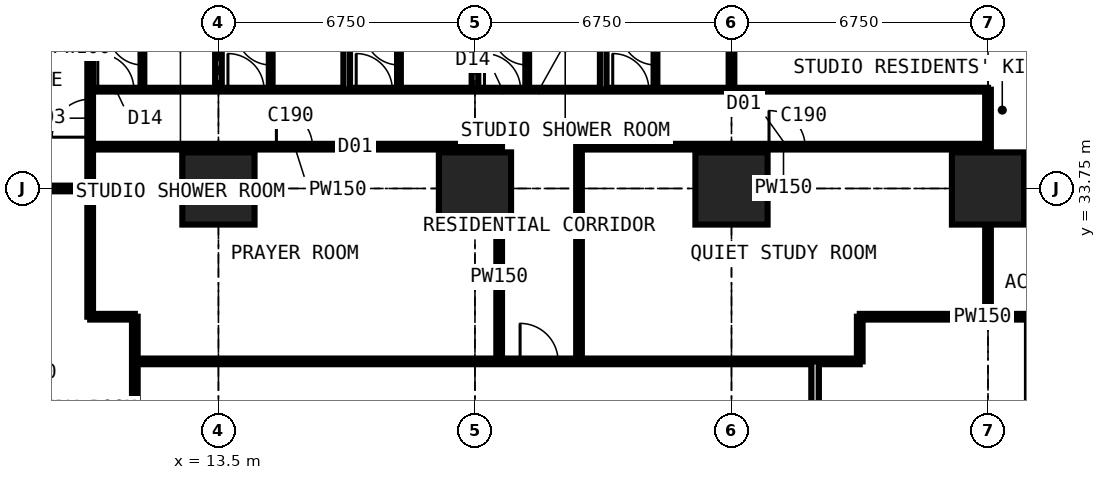
"""IFC4 building model, lengths in metres.
Left out: names, types, materials, properties, quantities, classifications, styles, units other than length and angle.
Written with IfcOpenShell. Run it as: python <this file> out.ifc"""

import sys

from ifc_helpers import new_model, si_unit, direction, frame, frame_2d, origin, origin_2d, place, context, subcontext, project, spatial, rectangle, extrude, element, fill, save


model = new_model("IFC4")
c1 = context("Model", 3, precision=1e-05, world=origin(), true_north=direction((0.0, 1.0)))
c2 = subcontext(c1, "Body", "Model", "MODEL_VIEW")
j1 = project(units=[si_unit("LENGTHUNIT", "METRE"), si_unit("PLANEANGLEUNIT", "RADIAN")], contexts=[c1])
p1 = place(None, origin())
s1 = spatial("IfcSite", under=j1, at=p1, CompositionType="ELEMENT")
p2 = place(p1, origin())
s2 = spatial("IfcBuilding", under=s1, at=p2, CompositionType="ELEMENT")
p3 = place(p2, frame((0.0, 0.0, 39.6)))
s3 = spatial("IfcBuildingStorey", under=s2, at=p3, CompositionType="ELEMENT", Elevation=39.6)
for number, where, z_axis, x_axis in (
    (1, (13.5, 33.75, 0.0), (0.0, 0.0, 1.0), (1.0, 0.0, 0.0)),
    (2, (20.25, 33.75, 0.0), (0.0, 0.0, 1.0), (1.0, 0.0, 0.0)),
    (3, (27.0, 33.75, 0.0), (0.0, 0.0, 1.0), (1.0, 0.0, 0.0)),
    (4, (33.75, 33.75, 0.0), (0.0, 0.0, 1.0), (1.0, 0.0, 0.0)),
):
    element("IfcColumn", number, at=place(p3, frame(where, z_axis=z_axis, x_axis=x_axis)), inside=s3, PredefinedType="COLUMN", context=c2, shape_type="SweptSolid", body=[
        extrude(rectangle(XDim=1.9, YDim=1.9, at=origin_2d()), origin(), (0.0, 0.0, 1.0), 3.6),
    ])
p4 = place(p3, frame((4.15, 33.75, 0.0), z_axis=(0.0, 0.0, 1.0), x_axis=(1.0, 0.0, 0.0)))
e5 = element("IfcWall", 5, at=p4, inside=s3, PredefinedType="PARTITIONING", context=c2, shape_type="SweptSolid", body=[
    extrude(rectangle(XDim=5.975, YDim=0.15, at=frame_2d((2.988, 0.0))), origin(), (0.0, 0.0, 1.0), 2.877),
])
p5 = place(p3, frame((10.125, 30.375, 0.0), z_axis=(0.0, 0.0, 1.0), x_axis=(0.0, 1.0, 0.0)))
e6 = element("IfcWall", 6, at=p5, inside=s3, PredefinedType="PARTITIONING", context=c2, shape_type="SweptSolid", body=[
    extrude(rectangle(XDim=10.859, YDim=0.15, at=frame_2d((5.429, 0.0))), origin(), (0.0, 0.0, 1.0), 3.375),
])
p6 = place(p5, frame((4.725, 0.0, 0.0)))
e7 = element("IfcOpeningElement", 7, at=p6, cuts=e6, PredefinedType="OPENING", context=c2, shape_type="SweptSolid", body=[
    extrude(rectangle(XDim=1.0, YDim=2.2, at=frame_2d((0.5, 1.1))), frame((0.0, 0.085, 0.0), z_axis=(0.0, -1.0, 0.0), x_axis=(1.0, 0.0, 0.0)), (0.0, 0.0, 1.0), 0.17),
])
p7 = place(p3, frame((10.125, 30.375, 0.0), z_axis=(0.0, 0.0, 1.0), x_axis=(1.0, 0.0, 0.0)))
e8 = element("IfcWall", 8, at=p7, inside=s3, PredefinedType="PARTITIONING", context=c2, shape_type="SweptSolid", body=[
    extrude(rectangle(XDim=1.175, YDim=0.15, at=frame_2d((0.587, 0.0))), origin(), (0.0, 0.0, 1.0), 3.375),
])
p8 = place(p3, frame((10.125, 34.85, 0.0), z_axis=(0.0, 0.0, 1.0), x_axis=(1.0, 0.0, 0.0)))
e9 = element("IfcWall", 9, at=p8, inside=s3, PredefinedType="PARTITIONING", context=c2, shape_type="SweptSolid", body=[
    extrude(rectangle(XDim=10.762, YDim=0.15, at=frame_2d((5.381, 0.0))), origin(), (0.0, 0.0, 1.0), 3.375),
])
p9 = place(p8, frame((4.9, 0.0, 0.0)))
e10 = element("IfcOpeningElement", 10, at=p9, cuts=e9, PredefinedType="OPENING", context=c2, shape_type="SweptSolid", body=[
    extrude(rectangle(XDim=0.95, YDim=2.2, at=frame_2d((0.475, 1.1))), frame((0.0, 0.085, 0.0), z_axis=(0.0, -1.0, 0.0), x_axis=(1.0, 0.0, 0.0)), (0.0, 0.0, 1.0), 0.17),
])
p10 = place(p3, frame((10.125, 36.35, 0.0), z_axis=(0.0, 0.0, 1.0), x_axis=(1.0, 0.0, 0.0)))
e11 = element("IfcWall", 11, at=p10, inside=s3, PredefinedType="PARTITIONING", context=c2, shape_type="SweptSolid", body=[
    extrude(rectangle(XDim=23.625, YDim=0.1, at=frame_2d((11.812, 0.0))), origin(), (0.0, 0.0, 1.0), 3.375),
])
p11 = place(p10, frame((0.2, 0.0, 0.0)))
e12 = element("IfcOpeningElement", 12, at=p11, cuts=e11, PredefinedType="OPENING", context=c2, shape_type="SweptSolid", body=[
    extrude(rectangle(XDim=0.95, YDim=2.2, at=frame_2d((0.475, 1.1))), frame((0.0, 0.06, 0.0), z_axis=(0.0, -1.0, 0.0), x_axis=(1.0, 0.0, 0.0)), (0.0, 0.0, 1.0), 0.12),
])
p12 = place(p10, frame((3.625, 0.0, 0.0)))
e13 = element("IfcOpeningElement", 13, at=p12, cuts=e11, PredefinedType="OPENING", context=c2, shape_type="SweptSolid", body=[
    extrude(rectangle(XDim=0.95, YDim=2.2, at=frame_2d((0.475, 1.1))), frame((0.0, 0.06, 0.0), z_axis=(0.0, -1.0, 0.0), x_axis=(1.0, 0.0, 0.0)), (0.0, 0.0, 1.0), 0.12),
])
p13 = place(p10, frame((7.0, 0.0, 0.0)))
e14 = element("IfcOpeningElement", 14, at=p13, cuts=e11, PredefinedType="OPENING", context=c2, shape_type="SweptSolid", body=[
    extrude(rectangle(XDim=0.95, YDim=2.2, at=frame_2d((0.475, 1.1))), frame((0.0, 0.06, 0.0), z_axis=(0.0, -1.0, 0.0), x_axis=(1.0, 0.0, 0.0)), (0.0, 0.0, 1.0), 0.12),
])
p14 = place(p10, frame((10.375, 0.0, 0.0)))
e15 = element("IfcOpeningElement", 15, at=p14, cuts=e11, PredefinedType="OPENING", context=c2, shape_type="SweptSolid", body=[
    extrude(rectangle(XDim=0.95, YDim=2.2, at=frame_2d((0.475, 1.1))), frame((0.0, 0.06, 0.0), z_axis=(0.0, -1.0, 0.0), x_axis=(1.0, 0.0, 0.0)), (0.0, 0.0, 1.0), 0.12),
])
p15 = place(p10, frame((13.75, 0.0, 0.0)))
e16 = element("IfcOpeningElement", 16, at=p15, cuts=e11, PredefinedType="OPENING", context=c2, shape_type="SweptSolid", body=[
    extrude(rectangle(XDim=0.95, YDim=2.2, at=frame_2d((0.475, 1.1))), frame((0.0, 0.06, 0.0), z_axis=(0.0, -1.0, 0.0), x_axis=(1.0, 0.0, 0.0)), (0.0, 0.0, 1.0), 0.12),
])
p16 = place(p3, frame((11.3, 11.3, 0.0), z_axis=(0.0, 0.0, 1.0), x_axis=(0.0, 1.0, 0.0)))
e17 = element("IfcWall", 17, at=p16, inside=s3, PredefinedType="PARTITIONING", context=c2, shape_type="SweptSolid", body=[
    extrude(rectangle(XDim=19.075, YDim=0.15, at=frame_2d((9.538, 0.0))), origin(), (0.0, 0.0, 1.0), 3.375),
])
p17 = place(p16, frame((10.137, 0.0, 0.0)))
e18 = element("IfcOpeningElement", 18, at=p17, cuts=e17, PredefinedType="OPENING", context=c2, shape_type="SweptSolid", body=[
    extrude(rectangle(XDim=1.0, YDim=2.2, at=frame_2d((0.5, 1.1))), frame((0.0, 0.085, 0.0), z_axis=(0.0, -1.0, 0.0), x_axis=(1.0, 0.0, 0.0)), (0.0, 0.0, 1.0), 0.17),
])
p18 = place(p3, frame((11.3, 29.2, 0.0), z_axis=(0.0, 0.0, 1.0), x_axis=(1.0, 0.0, 0.0)))
e19 = element("IfcWall", 19, at=p18, inside=s3, PredefinedType="PARTITIONING", context=c2, shape_type="SweptSolid", body=[
    extrude(rectangle(XDim=19.075, YDim=0.15, at=frame_2d((9.538, 0.0))), origin(), (0.0, 0.0, 1.0), 3.375),
])
p19 = place(p18, frame((10.137, 0.0, 0.0)))
e20 = element("IfcOpeningElement", 20, at=p19, cuts=e19, PredefinedType="OPENING", context=c2, shape_type="SweptSolid", body=[
    extrude(rectangle(XDim=1.0, YDim=2.2, at=frame_2d((0.5, 1.1))), frame((0.0, 0.085, 0.0), z_axis=(0.0, -1.0, 0.0), x_axis=(1.0, 0.0, 0.0)), (0.0, 0.0, 1.0), 0.17),
])
p20 = place(p3, frame((11.5, 36.35, 0.0), z_axis=(0.0, 0.0, 1.0), x_axis=(0.0, 1.0, 0.0)))
e21 = element("IfcWall", 21, at=p20, inside=s3, PredefinedType="PARTITIONING", context=c2, shape_type="SweptSolid", body=[
    extrude(rectangle(XDim=2.2, YDim=0.1, at=frame_2d((1.1, 0.0))), origin(), (0.0, 0.0, 1.0), 3.375),
])
p21 = place(p20, frame((0.65, 0.0, 0.0)))
e22 = element("IfcOpeningElement", 22, at=p21, cuts=e21, PredefinedType="OPENING", context=c2, shape_type="SweptSolid", body=[
    extrude(rectangle(XDim=0.9, YDim=2.2, at=frame_2d((0.45, 1.1))), frame((0.0, 0.06, 0.0), z_axis=(0.0, -1.0, 0.0), x_axis=(1.0, 0.0, 0.0)), (0.0, 0.0, 1.0), 0.12),
])
p22 = place(p3, frame((13.5, 36.35, 0.0), z_axis=(0.0, 0.0, 1.0), x_axis=(0.0, 1.0, 0.0)))
e23 = element("IfcWall", 23, at=p22, inside=s3, PredefinedType="PARTITIONING", context=c2, shape_type="SweptSolid", body=[
    extrude(rectangle(XDim=4.884, YDim=0.175, at=frame_2d((2.442, 0.0))), origin(), (0.0, 0.0, 1.0), 2.877),
])
p23 = place(p3, frame((14.875, 36.35, 0.0), z_axis=(0.0, 0.0, 1.0), x_axis=(0.0, 1.0, 0.0)))
e24 = element("IfcWall", 24, at=p23, inside=s3, PredefinedType="PARTITIONING", context=c2, shape_type="SweptSolid", body=[
    extrude(rectangle(XDim=2.2, YDim=0.1, at=frame_2d((1.1, 0.0))), origin(), (0.0, 0.0, 1.0), 3.375),
])
p24 = place(p23, frame((0.65, 0.0, 0.0)))
e25 = element("IfcOpeningElement", 25, at=p24, cuts=e24, PredefinedType="OPENING", context=c2, shape_type="SweptSolid", body=[
    extrude(rectangle(XDim=0.9, YDim=2.2, at=frame_2d((0.45, 1.1))), frame((0.0, 0.06, 0.0), z_axis=(0.0, -1.0, 0.0), x_axis=(1.0, 0.0, 0.0)), (0.0, 0.0, 1.0), 0.12),
])
p25 = place(p3, frame((16.875, 36.35, 0.0), z_axis=(0.0, 0.0, 1.0), x_axis=(0.0, 1.0, 0.0)))
e26 = element("IfcWall", 26, at=p25, inside=s3, PredefinedType="PARTITIONING", context=c2, shape_type="SweptSolid", body=[
    extrude(rectangle(XDim=4.884, YDim=0.175, at=frame_2d((2.442, 0.0))), origin(), (0.0, 0.0, 1.0), 3.375),
])
p26 = place(p3, frame((18.25, 36.35, 0.0), z_axis=(0.0, 0.0, 1.0), x_axis=(0.0, 1.0, 0.0)))
e27 = element("IfcWall", 27, at=p26, inside=s3, PredefinedType="PARTITIONING", context=c2, shape_type="SweptSolid", body=[
    extrude(rectangle(XDim=2.2, YDim=0.1, at=frame_2d((1.1, 0.0))), origin(), (0.0, 0.0, 1.0), 3.375),
])
p27 = place(p26, frame((0.65, 0.0, 0.0)))
e28 = element("IfcOpeningElement", 28, at=p27, cuts=e27, PredefinedType="OPENING", context=c2, shape_type="SweptSolid", body=[
    extrude(rectangle(XDim=0.9, YDim=2.2, at=frame_2d((0.45, 1.1))), frame((0.0, 0.06, 0.0), z_axis=(0.0, -1.0, 0.0), x_axis=(1.0, 0.0, 0.0)), (0.0, 0.0, 1.0), 0.12),
])
p28 = place(p3, frame((20.25, 36.35, 0.0), z_axis=(0.0, 0.0, 1.0), x_axis=(0.0, 1.0, 0.0)))
e29 = element("IfcWall", 29, at=p28, inside=s3, PredefinedType="PARTITIONING", context=c2, shape_type="SweptSolid", body=[
    extrude(rectangle(XDim=4.884, YDim=0.175, at=frame_2d((2.442, 0.0))), origin(), (0.0, 0.0, 1.0), 2.61),
])
p29 = place(p3, frame((20.887, 29.2, 0.0), z_axis=(0.0, 0.0, 1.0), x_axis=(0.0, 1.0, 0.0)))
e30 = element("IfcWall", 30, at=p29, inside=s3, PredefinedType="PARTITIONING", context=c2, shape_type="SweptSolid", body=[
    extrude(rectangle(XDim=5.65, YDim=0.15, at=frame_2d((2.825, 0.0))), origin(), (0.0, 0.0, 1.0), 3.375),
])
p30 = place(p3, frame((21.625, 36.35, 0.0), z_axis=(0.0, 0.0, 1.0), x_axis=(0.0, 1.0, 0.0)))
e31 = element("IfcWall", 31, at=p30, inside=s3, PredefinedType="PARTITIONING", context=c2, shape_type="SweptSolid", body=[
    extrude(rectangle(XDim=2.2, YDim=0.1, at=frame_2d((1.1, 0.0))), origin(), (0.0, 0.0, 1.0), 3.375),
])
p31 = place(p30, frame((0.65, 0.0, 0.0)))
e32 = element("IfcOpeningElement", 32, at=p31, cuts=e31, PredefinedType="OPENING", context=c2, shape_type="SweptSolid", body=[
    extrude(rectangle(XDim=0.9, YDim=2.2, at=frame_2d((0.45, 1.1))), frame((0.0, 0.06, 0.0), z_axis=(0.0, -1.0, 0.0), x_axis=(1.0, 0.0, 0.0)), (0.0, 0.0, 1.0), 0.12),
])
p32 = place(p3, frame((22.988, 34.85, 0.0), z_axis=(0.0, 0.0, 1.0), x_axis=(1.0, 0.0, 0.0)))
e33 = element("IfcWall", 33, at=p32, inside=s3, PredefinedType="PARTITIONING", context=c2, shape_type="SweptSolid", body=[
    extrude(rectangle(XDim=10.762, YDim=0.15, at=frame_2d((5.381, 0.0))), origin(), (0.0, 0.0, 1.0), 3.375),
])
p33 = place(p32, frame((5.0, 0.0, 0.0)))
e34 = element("IfcOpeningElement", 34, at=p33, cuts=e33, PredefinedType="OPENING", context=c2, shape_type="SweptSolid", body=[
    extrude(rectangle(XDim=0.95, YDim=2.2, at=frame_2d((0.475, 1.1))), frame((0.0, 0.085, 0.0), z_axis=(0.0, -1.0, 0.0), x_axis=(1.0, 0.0, 0.0)), (0.0, 0.0, 1.0), 0.17),
])
p34 = place(p3, frame((22.988, 29.2, 0.0), z_axis=(0.0, 0.0, 1.0), x_axis=(0.0, 1.0, 0.0)))
e35 = element("IfcWall", 35, at=p34, inside=s3, PredefinedType="PARTITIONING", context=c2, shape_type="SweptSolid", body=[
    extrude(rectangle(XDim=5.65, YDim=0.15, at=frame_2d((2.825, 0.0))), origin(), (0.0, 0.0, 1.0), 3.375),
])
p35 = place(p3, frame((23.625, 36.35, 0.0), z_axis=(0.0, 0.0, 1.0), x_axis=(0.0, 1.0, 0.0)))
e36 = element("IfcWall", 36, at=p35, inside=s3, PredefinedType="PARTITIONING", context=c2, shape_type="SweptSolid", body=[
    extrude(rectangle(XDim=4.884, YDim=0.175, at=frame_2d((2.442, 0.0))), origin(), (0.0, 0.0, 1.0), 3.375),
])
p36 = place(p3, frame((25.0, 36.35, 0.0), z_axis=(0.0, 0.0, 1.0), x_axis=(0.0, 1.0, 0.0)))
e37 = element("IfcWall", 37, at=p36, inside=s3, PredefinedType="PARTITIONING", context=c2, shape_type="SweptSolid", body=[
    extrude(rectangle(XDim=2.2, YDim=0.1, at=frame_2d((1.1, 0.0))), origin(), (0.0, 0.0, 1.0), 3.375),
])
p37 = place(p36, frame((0.65, 0.0, 0.0)))
e38 = element("IfcOpeningElement", 38, at=p37, cuts=e37, PredefinedType="OPENING", context=c2, shape_type="SweptSolid", body=[
    extrude(rectangle(XDim=0.9, YDim=2.2, at=frame_2d((0.45, 1.1))), frame((0.0, 0.06, 0.0), z_axis=(0.0, -1.0, 0.0), x_axis=(1.0, 0.0, 0.0)), (0.0, 0.0, 1.0), 0.12),
])
p38 = place(p3, frame((27.0, 36.35, 0.0), z_axis=(0.0, 0.0, 1.0), x_axis=(0.0, 1.0, 0.0)))
e39 = element("IfcWall", 39, at=p38, inside=s3, PredefinedType="PARTITIONING", context=c2, shape_type="SweptSolid", body=[
    extrude(rectangle(XDim=4.884, YDim=0.15, at=frame_2d((2.442, 0.0))), origin(), (0.0, 0.0, 1.0), 2.61),
])
p39 = place(p3, frame((29.2, 11.3, 0.0), z_axis=(0.0, 0.0, 1.0), x_axis=(0.0, 1.0, 0.0)))
e40 = element("IfcWall", 40, at=p39, inside=s3, PredefinedType="PARTITIONING", context=c2, shape_type="SweptSolid", body=[
    extrude(rectangle(XDim=17.9, YDim=0.2, at=frame_2d((8.95, 0.0))), origin(), (0.0, 0.0, 1.0), 3.375),
])
p40 = place(p39, frame((8.35, 0.0, 0.0)))
e41 = element("IfcOpeningElement", 41, at=p40, cuts=e40, PredefinedType="OPENING", context=c2, shape_type="SweptSolid", body=[
    extrude(rectangle(XDim=1.2, YDim=2.2, at=frame_2d((0.6, 1.1))), frame((0.0, 0.11, 0.0), z_axis=(0.0, -1.0, 0.0), x_axis=(1.0, 0.0, 0.0)), (0.0, 0.0, 1.0), 0.22),
])
p41 = place(p3, frame((30.375, 29.2, 0.0), z_axis=(0.0, 0.0, 1.0), x_axis=(0.0, 1.0, 0.0)))
e42 = element("IfcWall", 42, at=p41, inside=s3, PredefinedType="PARTITIONING", context=c2, shape_type="SweptSolid", body=[
    extrude(rectangle(XDim=1.175, YDim=0.15, at=frame_2d((0.587, 0.0))), origin(), (0.0, 0.0, 1.0), 3.375),
])
p42 = place(p3, frame((30.375, 30.375, 0.0), z_axis=(0.0, 0.0, 1.0), x_axis=(1.0, 0.0, 0.0)))
e43 = element("IfcWall", 43, at=p42, inside=s3, PredefinedType="PARTITIONING", context=c2, shape_type="SweptSolid", body=[
    extrude(rectangle(XDim=10.859, YDim=0.15, at=frame_2d((5.429, 0.0))), origin(), (0.0, 0.0, 1.0), 3.375),
])
p43 = place(p42, frame((4.725, 0.0, 0.0)))
e44 = element("IfcOpeningElement", 44, at=p43, cuts=e43, PredefinedType="OPENING", context=c2, shape_type="SweptSolid", body=[
    extrude(rectangle(XDim=1.0, YDim=2.2, at=frame_2d((0.5, 1.1))), frame((0.0, 0.085, 0.0), z_axis=(0.0, -1.0, 0.0), x_axis=(1.0, 0.0, 0.0)), (0.0, 0.0, 1.0), 0.17),
])
p44 = place(p3, frame((33.75, 30.375, 0.0), z_axis=(0.0, 0.0, 1.0), x_axis=(0.0, 1.0, 0.0)))
e45 = element("IfcWall", 45, at=p44, inside=s3, PredefinedType="PARTITIONING", context=c2, shape_type="SweptSolid", body=[
    extrude(rectangle(XDim=5.975, YDim=0.15, at=frame_2d((2.988, 0.0))), origin(), (0.0, 0.0, 1.0), 2.877),
])
p45 = place(p11, origin())
e46 = element("IfcDoor", 46, at=p45, inside=s3, OperationType="SINGLE_SWING_LEFT", PredefinedType="DOOR", context=c2, shape_type="SweptSolid", body=[
    extrude(rectangle(XDim=0.95, YDim=2.2, at=frame_2d((0.475, 1.1))), frame((0.0, 0.025, 0.0), z_axis=(0.0, -1.0, 0.0), x_axis=(1.0, 0.0, 0.0)), (0.0, 0.0, 1.0), 0.05),
])
fill(e12, e46)
p46 = place(p21, origin())
e47 = element("IfcDoor", 47, at=p46, inside=s3, OperationType="SINGLE_SWING_RIGHT", PredefinedType="DOOR", context=c2, shape_type="SweptSolid", body=[
    extrude(rectangle(XDim=0.9, YDim=2.2, at=frame_2d((0.45, 1.1))), frame((0.0, 0.025, 0.0), z_axis=(0.0, -1.0, 0.0), x_axis=(1.0, 0.0, 0.0)), (0.0, 0.0, 1.0), 0.05),
])
fill(e22, e47)
p47 = place(p12, origin())
e48 = element("IfcDoor", 48, at=p47, inside=s3, OperationType="SINGLE_SWING_LEFT", PredefinedType="DOOR", context=c2, shape_type="SweptSolid", body=[
    extrude(rectangle(XDim=0.95, YDim=2.2, at=frame_2d((0.475, 1.1))), frame((0.0, 0.025, 0.0), z_axis=(0.0, -1.0, 0.0), x_axis=(1.0, 0.0, 0.0)), (0.0, 0.0, 1.0), 0.05),
])
fill(e13, e48)
p48 = place(p24, origin())
e49 = element("IfcDoor", 49, at=p48, inside=s3, OperationType="SINGLE_SWING_RIGHT", PredefinedType="DOOR", context=c2, shape_type="SweptSolid", body=[
    extrude(rectangle(XDim=0.9, YDim=2.2, at=frame_2d((0.45, 1.1))), frame((0.0, 0.025, 0.0), z_axis=(0.0, -1.0, 0.0), x_axis=(1.0, 0.0, 0.0)), (0.0, 0.0, 1.0), 0.05),
])
fill(e25, e49)
p49 = place(p13, origin())
e50 = element("IfcDoor", 50, at=p49, inside=s3, OperationType="SINGLE_SWING_LEFT", PredefinedType="DOOR", context=c2, shape_type="SweptSolid", body=[
    extrude(rectangle(XDim=0.95, YDim=2.2, at=frame_2d((0.475, 1.1))), frame((0.0, 0.025, 0.0), z_axis=(0.0, -1.0, 0.0), x_axis=(1.0, 0.0, 0.0)), (0.0, 0.0, 1.0), 0.05),
])
fill(e14, e50)
p50 = place(p27, origin())
e51 = element("IfcDoor", 51, at=p50, inside=s3, OperationType="SINGLE_SWING_RIGHT", PredefinedType="DOOR", context=c2, shape_type="SweptSolid", body=[
    extrude(rectangle(XDim=0.9, YDim=2.2, at=frame_2d((0.45, 1.1))), frame((0.0, 0.025, 0.0), z_axis=(0.0, -1.0, 0.0), x_axis=(1.0, 0.0, 0.0)), (0.0, 0.0, 1.0), 0.05),
])
fill(e28, e51)
p51 = place(p14, origin())
e52 = element("IfcDoor", 52, at=p51, inside=s3, OperationType="SINGLE_SWING_LEFT", PredefinedType="DOOR", context=c2, shape_type="SweptSolid", body=[
    extrude(rectangle(XDim=0.95, YDim=2.2, at=frame_2d((0.475, 1.1))), frame((0.0, 0.025, 0.0), z_axis=(0.0, -1.0, 0.0), x_axis=(1.0, 0.0, 0.0)), (0.0, 0.0, 1.0), 0.05),
])
fill(e15, e52)
p52 = place(p31, origin())
e53 = element("IfcDoor", 53, at=p52, inside=s3, OperationType="SINGLE_SWING_RIGHT", PredefinedType="DOOR", context=c2, shape_type="SweptSolid", body=[
    extrude(rectangle(XDim=0.9, YDim=2.2, at=frame_2d((0.45, 1.1))), frame((0.0, 0.025, 0.0), z_axis=(0.0, -1.0, 0.0), x_axis=(1.0, 0.0, 0.0)), (0.0, 0.0, 1.0), 0.05),
])
fill(e32, e53)
p53 = place(p15, origin())
e54 = element("IfcDoor", 54, at=p53, inside=s3, OperationType="SINGLE_SWING_LEFT", PredefinedType="DOOR", context=c2, shape_type="SweptSolid", body=[
    extrude(rectangle(XDim=0.95, YDim=2.2, at=frame_2d((0.475, 1.1))), frame((0.0, 0.025, 0.0), z_axis=(0.0, -1.0, 0.0), x_axis=(1.0, 0.0, 0.0)), (0.0, 0.0, 1.0), 0.05),
])
fill(e16, e54)
p54 = place(p37, origin())
e55 = element("IfcDoor", 55, at=p54, inside=s3, OperationType="SINGLE_SWING_RIGHT", PredefinedType="DOOR", context=c2, shape_type="SweptSolid", body=[
    extrude(rectangle(XDim=0.9, YDim=2.2, at=frame_2d((0.45, 1.1))), frame((0.0, 0.025, 0.0), z_axis=(0.0, -1.0, 0.0), x_axis=(1.0, 0.0, 0.0)), (0.0, 0.0, 1.0), 0.05),
])
fill(e38, e55)
p55 = place(p19, origin())
e56 = element("IfcDoor", 56, at=p55, inside=s3, OperationType="SINGLE_SWING_LEFT", PredefinedType="DOOR", context=c2, shape_type="SweptSolid", body=[
    extrude(rectangle(XDim=1.0, YDim=2.2, at=frame_2d((0.5, 1.1))), frame((0.0, 0.025, 0.0), z_axis=(0.0, -1.0, 0.0), x_axis=(1.0, 0.0, 0.0)), (0.0, 0.0, 1.0), 0.05),
])
fill(e20, e56)
p56 = place(p9, origin())
e57 = element("IfcDoor", 57, at=p56, inside=s3, OperationType="SINGLE_SWING_LEFT", PredefinedType="DOOR", context=c2, shape_type="SweptSolid", body=[
    extrude(rectangle(XDim=0.95, YDim=2.2, at=frame_2d((0.475, 1.1))), frame((0.0, 0.025, 0.0), z_axis=(0.0, -1.0, 0.0), x_axis=(1.0, 0.0, 0.0)), (0.0, 0.0, 1.0), 0.05),
])
fill(e10, e57)
p57 = place(p33, origin())
e58 = element("IfcDoor", 58, at=p57, inside=s3, OperationType="SINGLE_SWING_LEFT", PredefinedType="DOOR", context=c2, shape_type="SweptSolid", body=[
    extrude(rectangle(XDim=0.95, YDim=2.2, at=frame_2d((0.475, 1.1))), frame((0.0, 0.025, 0.0), z_axis=(0.0, -1.0, 0.0), x_axis=(1.0, 0.0, 0.0)), (0.0, 0.0, 1.0), 0.05),
])
fill(e34, e58)
p58 = place(p6, origin())
e59 = element("IfcDoor", 59, at=p58, inside=s3, OperationType="SINGLE_SWING_LEFT", PredefinedType="DOOR", context=c2, shape_type="SweptSolid", body=[
    extrude(rectangle(XDim=1.0, YDim=2.2, at=frame_2d((0.5, 1.1))), frame((0.0, 0.025, 0.0), z_axis=(0.0, -1.0, 0.0), x_axis=(1.0, 0.0, 0.0)), (0.0, 0.0, 1.0), 0.05),
])
fill(e7, e59)
save(model, sys.argv[1])
